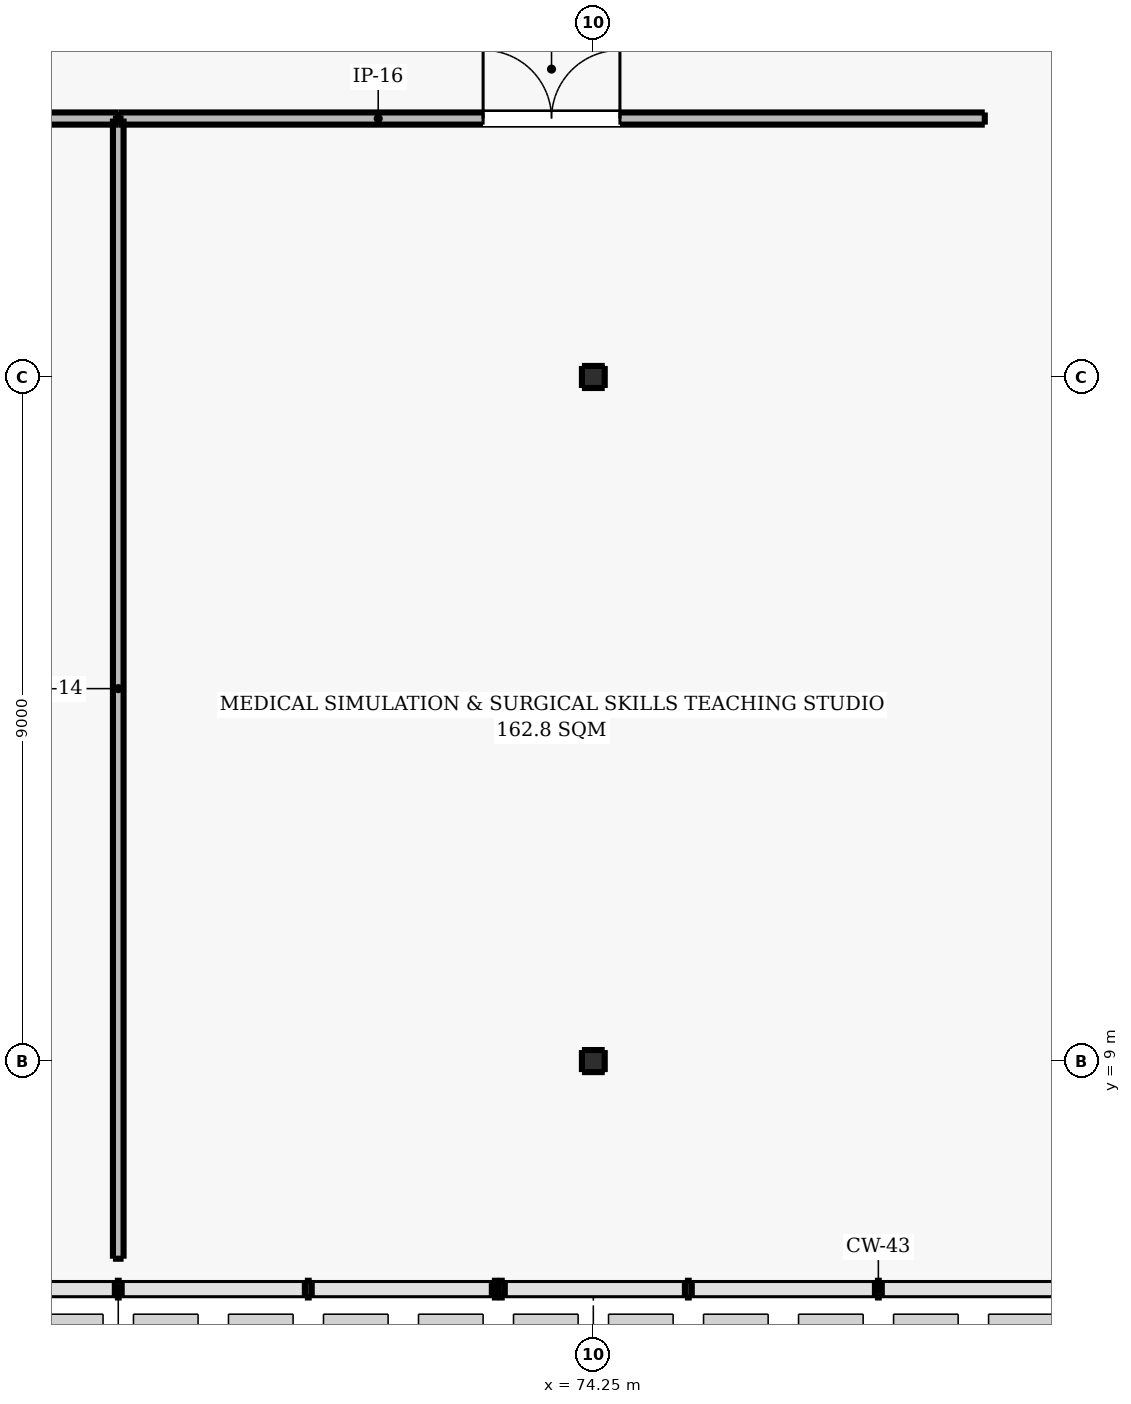
"""IFC4 building model, lengths in metres.
Left out: names, types, materials, properties, quantities, classifications, styles, units other than length and angle.
Written with IfcOpenShell. Run it as: python <this file> out.ifc"""

import sys

from ifc_helpers import new_model, si_unit, direction, frame, frame_2d, origin, origin_2d, place, context, subcontext, project, spatial, rectangle, i_section, extrude, element, fill, save


model = new_model("IFC4")
c1 = context("Model", 3, precision=1e-05, world=origin(), true_north=direction((0.0, 1.0)))
c2 = subcontext(c1, "Body", "Model", "MODEL_VIEW")
j1 = project(units=[si_unit("LENGTHUNIT", "METRE"), si_unit("PLANEANGLEUNIT", "RADIAN")], contexts=[c1])
p1 = place(None, origin())
s1 = spatial("IfcSite", under=j1, at=p1, CompositionType="ELEMENT")
p2 = place(p1, origin())
s2 = spatial("IfcBuilding", under=s1, at=p2, CompositionType="ELEMENT")
p3 = place(p2, frame((0.0, 0.0, 26.4)))
s3 = spatial("IfcBuildingStorey", under=s2, at=p3, CompositionType="ELEMENT", Elevation=26.4)
for number, where, z_axis, x_axis in (
    (1, (74.25, 9.0, 0.0), (0.0, 0.0, 1.0), (1.0, 0.0, 0.0)),
    (2, (74.25, 18.0, 0.0), (0.0, 0.0, 1.0), (1.0, 0.0, 0.0)),
):
    element("IfcColumn", number, at=place(p3, frame(where, z_axis=z_axis, x_axis=x_axis)), inside=s3, PredefinedType="COLUMN", context=c2, shape_type="SweptSolid", body=[
        extrude(i_section(OverallWidth=0.3, OverallDepth=0.29, WebThickness=0.009, FlangeThickness=0.014, FilletRadius=0.027, at=origin_2d()), origin(), (0.0, 0.0, 1.0), 4.2),
    ])
p4 = place(p3, frame((56.0, 21.4, 0.0), z_axis=(0.0, 0.0, 1.0), x_axis=(1.0, 0.0, 0.0)))
e3 = element("IfcWall", 3, at=p4, inside=s3, PredefinedType="PARTITIONING", context=c2, shape_type="SweptSolid", body=[
    extrude(rectangle(XDim=12.0, YDim=0.16, at=frame_2d((6.0, 0.0))), origin(), (0.0, 0.0, 1.0), 3.93),
])
p5 = place(p4, frame((5.1, 0.0, 0.0)))
e4 = element("IfcOpeningElement", 4, at=p5, cuts=e3, PredefinedType="OPENING", context=c2, shape_type="SweptSolid", body=[
    extrude(rectangle(XDim=1.8, YDim=2.25, at=frame_2d((0.9, 1.125))), frame((0.0, 0.09, 0.0), z_axis=(0.0, -1.0, 0.0), x_axis=(1.0, 0.0, 0.0)), (0.0, 0.0, 1.0), 0.18),
])
p6 = place(p3, frame((68.0, 6.4, 0.0), z_axis=(0.0, 0.0, 1.0), x_axis=(0.0, 1.0, 0.0)))
e5 = element("IfcWall", 5, at=p6, inside=s3, PredefinedType="PARTITIONING", context=c2, shape_type="SweptSolid", body=[
    extrude(rectangle(XDim=15.0, YDim=0.14, at=frame_2d((7.5, 0.0))), origin(), (0.0, 0.0, 1.0), 3.93),
])
p7 = place(p3, frame((68.0, 21.4, 0.0), z_axis=(0.0, 0.0, 1.0), x_axis=(1.0, 0.0, 0.0)))
e6 = element("IfcWall", 6, at=p7, inside=s3, PredefinedType="PARTITIONING", context=c2, shape_type="SweptSolid", body=[
    extrude(rectangle(XDim=11.4, YDim=0.16, at=frame_2d((5.7, 0.0))), origin(), (0.0, 0.0, 1.0), 3.93),
])
p8 = place(p7, frame((4.8, 0.0, 0.0)))
e7 = element("IfcOpeningElement", 7, at=p8, cuts=e6, PredefinedType="OPENING", context=c2, shape_type="SweptSolid", body=[
    extrude(rectangle(XDim=1.8, YDim=2.25, at=frame_2d((0.9, 1.125))), frame((0.0, 0.09, 0.0), z_axis=(0.0, -1.0, 0.0), x_axis=(1.0, 0.0, 0.0)), (0.0, 0.0, 1.0), 0.18),
])
p9 = place(p8, origin())
e8 = element("IfcDoor", 8, at=p9, inside=s3, OperationType="DOUBLE_DOOR_SINGLE_SWING", PredefinedType="DOOR", context=c2, shape_type="SweptSolid", body=[
    extrude(rectangle(XDim=1.8, YDim=2.25, at=frame_2d((0.9, 1.125))), frame((0.0, 0.025, 0.0), z_axis=(0.0, -1.0, 0.0), x_axis=(1.0, 0.0, 0.0)), (0.0, 0.0, 1.0), 0.05),
])
fill(e7, e8)
save(model, sys.argv[1])
